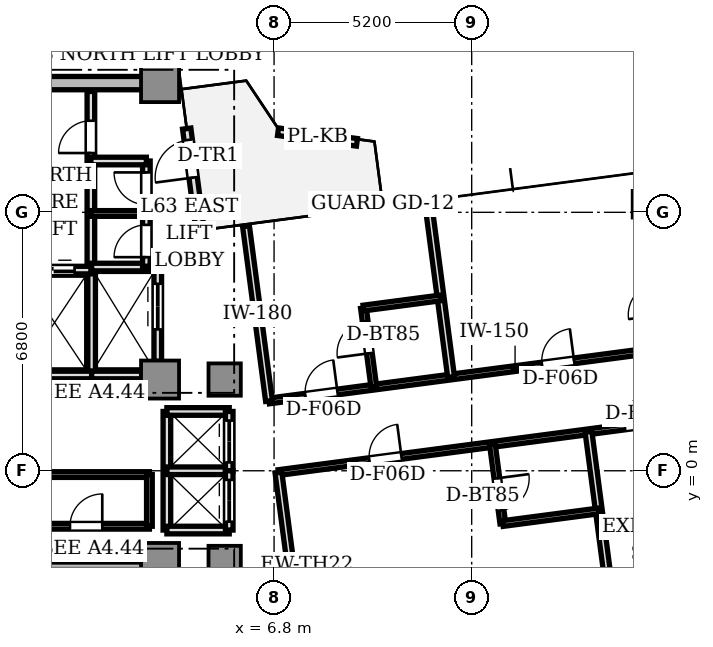
"""IFC4 building model, lengths in metres.
Left out: names, types, materials, properties, quantities, classifications, styles, units other than length and angle.
Written with IfcOpenShell. Run it as: python <this file> out.ifc"""

import sys

from ifc_helpers import new_model, si_unit, direction, frame, frame_2d, origin, origin_2d, place, context, subcontext, project, spatial, rectangle, extrude, source, transform, mapped, element, fill, save


model = new_model("IFC4")
c1 = context("Model", 3, precision=1e-05, world=origin(), true_north=direction((0.0, 1.0)))
c2 = subcontext(c1, "Body", "Model", "MODEL_VIEW")
j1 = project(units=[si_unit("LENGTHUNIT", "METRE"), si_unit("PLANEANGLEUNIT", "RADIAN")], contexts=[c1])
p1 = place(None, origin())
s1 = spatial("IfcSite", under=j1, at=p1, CompositionType="ELEMENT")
p2 = place(p1, origin())
s2 = spatial("IfcBuilding", under=s1, at=p2, CompositionType="ELEMENT")
p3 = place(p2, frame((0.0, 0.0, 226.6)))
s3 = spatial("IfcBuildingStorey", under=s2, at=p3, CompositionType="ELEMENT", Elevation=226.6)
p4 = place(p3, frame((-3.55, 10.2, 0.0), z_axis=(0.0, 0.0, 1.0), x_axis=(1.0, 0.0, 0.0)))
e1 = element("IfcWall", 1, at=p4, inside=s3, PredefinedType="SHEAR", context=c2, shape_type="SweptSolid", body=[
    extrude(rectangle(XDim=7.1, YDim=0.35, at=frame_2d((3.55, 0.0))), origin(), (0.0, 0.0, 1.0), 3.05),
])
m1 = source(origin(), c2, "Body", "SweptSolid", [
    extrude(rectangle(XDim=1.0, YDim=1.0, at=origin_2d()), origin(), (0.0, 0.0, 1.0), 3.05),
])
for number, where, z_axis, x_axis in (
    (2, (3.8, 2.4, 0.0), (0.0, 0.0, 1.0), (1.0, 0.0, 0.0)),
    (3, (3.8, 10.2, 0.0), (0.0, 0.0, 1.0), (1.0, 0.0, 0.0)),
    (4, (3.8, -2.4, 0.0), (0.0, 0.0, 1.0), (1.0, 0.0, 0.0)),
):
    element("IfcColumn", number, at=place(p3, frame(where, z_axis=z_axis, x_axis=x_axis)), inside=s3, PredefinedType="COLUMN", context=c2, shape_type="MappedRepresentation", body=[
        mapped(m1, transform((0.0, 0.0, 0.0), scale=1.0)),
    ])
m2 = source(origin(), c2, "Body", "SweptSolid", [
    extrude(rectangle(XDim=0.85, YDim=0.85, at=origin_2d()), origin(), (0.0, 0.0, 1.0), 3.05),
])
for number, where, z_axis, x_axis in (
    (5, (5.5, 2.4, 0.0), (0.0, 0.0, 1.0), (1.0, 0.0, 0.0)),
    (6, (5.5, -2.4, 0.0), (0.0, 0.0, 1.0), (1.0, 0.0, 0.0)),
):
    element("IfcColumn", number, at=place(p3, frame(where, z_axis=z_axis, x_axis=x_axis)), inside=s3, PredefinedType="COLUMN", context=c2, shape_type="MappedRepresentation", body=[
        mapped(m2, transform((0.0, 0.0, 0.0), scale=1.0)),
    ])
m3 = source(origin(), c2, "Body", "SweptSolid", [
    extrude(rectangle(XDim=0.7, YDim=0.7, at=origin_2d()), origin(), (0.0, 0.0, 1.0), 3.05),
])
p5 = place(p3, frame((16.586, 7.013, 0.0), z_axis=(0.0, 0.0, 1.0), x_axis=(1.0, 0.0, 0.0)))
e7 = element("IfcColumn", 7, at=p5, inside=s3, PredefinedType="COLUMN", context=c2, shape_type="MappedRepresentation", body=[
    mapped(m3, transform((0.0, 0.0, 0.0), scale=1.0)),
])
p6 = place(p3, frame((4.854, 6.326, 0.0), z_axis=(0.0, 0.0, 1.0), x_axis=(-0.130564442062, 0.991439824936, 0.0)))
e8 = element("IfcWall", 8, at=p6, inside=s3, PredefinedType="STANDARD", context=c2, shape_type="SweptSolid", body=[
    extrude(rectangle(XDim=2.7, YDim=0.22, at=frame_2d((1.35, 0.0))), origin(), (0.0, 0.0, 1.0), 3.05),
])
p7 = place(p6, frame((1.4, 0.0, 0.0)))
e9 = element("IfcOpeningElement", 9, at=p7, cuts=e8, PredefinedType="OPENING", context=c2, shape_type="SweptSolid", body=[
    extrude(rectangle(XDim=1.0, YDim=2.2, at=frame_2d((0.5, 1.1))), frame((0.0, 0.12, 0.0), z_axis=(0.0, -1.0, 0.0), x_axis=(1.0, 0.0, 0.0)), (0.0, 0.0, 1.0), 0.24),
])
p8 = place(p3, frame((8.981, 8.642, 0.0), z_axis=(0.0, 0.0, 1.0), x_axis=(-0.991074582074, 0.133308562245, 0.0)))
e10 = element("IfcWall", 10, at=p8, inside=s3, PredefinedType="PARAPET", context=c2, shape_type="SweptSolid", body=[
    extrude(rectangle(XDim=2.095, YDim=0.2, at=frame_2d((1.048, 0.0))), origin(), (0.0, 0.0, 1.0), 0.65),
])
p9 = place(p3, frame((0.0, -2.5, 0.0), z_axis=(0.0, 0.0, 1.0), x_axis=(1.0, 0.0, 0.0)))
e11 = element("IfcWall", 11, at=p9, inside=s3, PredefinedType="SOLIDWALL", context=c2, shape_type="SweptSolid", body=[
    extrude(rectangle(XDim=3.72, YDim=0.2, at=frame_2d((1.86, 0.0))), origin(), (0.0, 0.0, 1.0), 3.05),
])
p10 = place(p3, frame((1.98, 5.32, 0.0), z_axis=(0.0, 0.0, 1.0), x_axis=(0.0, 1.0, 0.0)))
e12 = element("IfcWall", 12, at=p10, inside=s3, PredefinedType="SOLIDWALL", context=c2, shape_type="SweptSolid", body=[
    extrude(rectangle(XDim=4.66, YDim=0.2, at=frame_2d((2.33, 0.0))), origin(), (0.0, 0.0, 1.0), 2.6),
])
p11 = place(p10, frame((3.04, 0.0, 0.0)))
e13 = element("IfcOpeningElement", 13, at=p11, cuts=e12, PredefinedType="OPENING", context=c2, shape_type="SweptSolid", body=[
    extrude(rectangle(XDim=0.85, YDim=2.1, at=frame_2d((0.425, 1.05))), frame((0.0, 0.11, 0.0), z_axis=(0.0, -1.0, 0.0), x_axis=(1.0, 0.0, 0.0)), (0.0, 0.0, 1.0), 0.22),
])
p12 = place(p3, frame((2.0, 2.5, 0.0), z_axis=(0.0, 0.0, 1.0), x_axis=(0.0, 1.0, 0.0)))
e14 = element("IfcWall", 14, at=p12, inside=s3, PredefinedType="SOLIDWALL", context=c2, shape_type="SweptSolid", body=[
    extrude(rectangle(XDim=2.78, YDim=0.2, at=frame_2d((1.39, 0.0))), origin(), (0.0, 0.0, 1.0), 2.6),
])
p13 = place(p3, frame((0.05, 2.52, 0.0), z_axis=(0.0, 0.0, 1.0), x_axis=(1.0, 0.0, 0.0)))
e15 = element("IfcWall", 15, at=p13, inside=s3, PredefinedType="SOLIDWALL", context=c2, shape_type="SweptSolid", body=[
    extrude(rectangle(XDim=1.95, YDim=0.2, at=frame_2d((0.975, 0.0))), origin(), (0.0, 0.0, 1.0), 2.6),
])
p14 = place(p3, frame((0.05, 5.28, 0.0), z_axis=(0.0, 0.0, 1.0), x_axis=(1.0, 0.0, 0.0)))
e16 = element("IfcWall", 16, at=p14, inside=s3, PredefinedType="SOLIDWALL", context=c2, shape_type="SweptSolid", body=[
    extrude(rectangle(XDim=1.93, YDim=0.2, at=frame_2d((0.965, 0.0))), origin(), (0.0, 0.0, 1.0), 2.6),
])
p15 = place(p14, frame((0.4, 0.0, 0.0)))
e17 = element("IfcOpeningElement", 17, at=p15, cuts=e16, PredefinedType="OPENING", context=c2, shape_type="SweptSolid", body=[
    extrude(rectangle(XDim=1.1, YDim=2.2, at=frame_2d((0.55, 1.1))), frame((0.0, 0.11, 0.0), z_axis=(0.0, -1.0, 0.0), x_axis=(1.0, 0.0, 0.0)), (0.0, 0.0, 1.0), 0.22),
])
p16 = place(p3, frame((2.0, 2.52, 0.0), z_axis=(0.0, 0.0, 1.0), x_axis=(1.0, 0.0, 0.0)))
e18 = element("IfcWall", 18, at=p16, inside=s3, PredefinedType="SOLIDWALL", context=c2, shape_type="SweptSolid", body=[
    extrude(rectangle(XDim=1.32, YDim=0.2, at=frame_2d((0.66, 0.0))), origin(), (0.0, 0.0, 1.0), 2.6),
])
p17 = place(p3, frame((2.0, 5.36, 0.0), z_axis=(0.0, 0.0, 1.0), x_axis=(1.0, 0.0, 0.0)))
e19 = element("IfcWall", 19, at=p17, inside=s3, PredefinedType="SOLIDWALL", context=c2, shape_type="SweptSolid", body=[
    extrude(rectangle(XDim=1.74, YDim=0.2, at=frame_2d((0.87, 0.0))), origin(), (0.0, 0.0, 1.0), 2.6),
])
p18 = place(p3, frame((3.74, 2.88, 0.0), z_axis=(0.0, 0.0, 1.0), x_axis=(0.0, 1.0, 0.0)))
e20 = element("IfcWall", 20, at=p18, inside=s3, PredefinedType="SOLIDWALL", context=c2, shape_type="SweptSolid", body=[
    extrude(rectangle(XDim=2.48, YDim=0.2, at=frame_2d((1.24, 0.0))), origin(), (0.0, 0.0, 1.0), 2.6),
])
p19 = place(p18, frame((0.84, 0.0, 0.0)))
e21 = element("IfcOpeningElement", 21, at=p19, cuts=e20, PredefinedType="OPENING", context=c2, shape_type="SweptSolid", body=[
    extrude(rectangle(XDim=1.2, YDim=2.2, at=frame_2d((0.6, 1.1))), frame((0.0, 0.11, 0.0), z_axis=(0.0, -1.0, 0.0), x_axis=(1.0, 0.0, 0.0)), (0.0, 0.0, 1.0), 0.22),
])
p20 = place(p3, frame((3.98, -1.56, 0.0), z_axis=(0.0, 0.0, 1.0), x_axis=(0.0, 1.0, 0.0)))
e22 = element("IfcWall", 22, at=p20, inside=s3, PredefinedType="SOLIDWALL", context=c2, shape_type="SweptSolid", body=[
    extrude(rectangle(XDim=3.12, YDim=0.2, at=frame_2d((1.56, 0.0))), origin(), (0.0, 0.0, 1.0), 2.27),
])
for number, where, z_axis, x_axis in (
    (23, (3.98, 1.56, 0.0), (0.0, 0.0, 1.0), (1.0, 0.0, 0.0)),
    (24, (3.98, -1.56, 0.0), (0.0, 0.0, 1.0), (1.0, 0.0, 0.0)),
    (25, (3.98, 0.0, 0.0), (0.0, 0.0, 1.0), (1.0, 0.0, 0.0)),
):
    element("IfcWall", number, at=place(p3, frame(where, z_axis=z_axis, x_axis=x_axis)), inside=s3, PredefinedType="SOLIDWALL", context=c2, shape_type="SweptSolid", body=[
        extrude(rectangle(XDim=1.64, YDim=0.2, at=frame_2d((0.82, 0.0))), origin(), (0.0, 0.0, 1.0), 2.6),
    ])
p21 = place(p3, frame((5.62, 0.0, 0.0), z_axis=(0.0, 0.0, 1.0), x_axis=(0.0, 1.0, 0.0)))
e26 = element("IfcWall", 26, at=p21, inside=s3, PredefinedType="SOLIDWALL", context=c2, shape_type="SweptSolid", body=[
    extrude(rectangle(XDim=1.56, YDim=0.2, at=frame_2d((0.78, 0.0))), origin(), (0.0, 0.0, 1.0), 2.6),
])
p22 = place(p21, frame((0.22, 0.0, 0.0)))
e27 = element("IfcOpeningElement", 27, at=p22, cuts=e26, PredefinedType="OPENING", context=c2, shape_type="SweptSolid", body=[
    extrude(rectangle(XDim=1.1, YDim=2.2, at=frame_2d((0.55, 1.1))), frame((0.0, 0.11, 0.0), z_axis=(0.0, -1.0, 0.0), x_axis=(1.0, 0.0, 0.0)), (0.0, 0.0, 1.0), 0.22),
])
p23 = place(p3, frame((5.62, -1.56, 0.0), z_axis=(0.0, 0.0, 1.0), x_axis=(0.0, 1.0, 0.0)))
e28 = element("IfcWall", 28, at=p23, inside=s3, PredefinedType="SOLIDWALL", context=c2, shape_type="SweptSolid", body=[
    extrude(rectangle(XDim=1.56, YDim=0.2, at=frame_2d((0.78, 0.0))), origin(), (0.0, 0.0, 1.0), 2.6),
])
p24 = place(p23, frame((0.22, 0.0, 0.0)))
e29 = element("IfcOpeningElement", 29, at=p24, cuts=e28, PredefinedType="OPENING", context=c2, shape_type="SweptSolid", body=[
    extrude(rectangle(XDim=1.1, YDim=2.2, at=frame_2d((0.55, 1.1))), frame((0.0, 0.11, 0.0), z_axis=(0.0, -1.0, 0.0), x_axis=(1.0, 0.0, 0.0)), (0.0, 0.0, 1.0), 0.22),
])
p25 = place(p3, frame((3.44, 5.38, 0.0), z_axis=(0.0, 0.0, 1.0), x_axis=(0.0, 1.0, 0.0)))
e30 = element("IfcWall", 30, at=p25, inside=s3, PredefinedType="SOLIDWALL", context=c2, shape_type="SweptSolid", body=[
    extrude(rectangle(XDim=2.77, YDim=0.2, at=frame_2d((1.385, 0.0))), origin(), (0.0, 0.0, 1.0), 2.6),
])
p26 = place(p25, frame((0.24, 0.0, 0.0)))
e31 = element("IfcOpeningElement", 31, at=p26, cuts=e30, PredefinedType="OPENING", context=c2, shape_type="SweptSolid", body=[
    extrude(rectangle(XDim=0.85, YDim=2.1, at=frame_2d((0.425, 1.05))), frame((0.0, 0.11, 0.0), z_axis=(0.0, -1.0, 0.0), x_axis=(1.0, 0.0, 0.0)), (0.0, 0.0, 1.0), 0.22),
])
p27 = place(p25, frame((1.62, 0.0, 0.0)))
e32 = element("IfcOpeningElement", 32, at=p27, cuts=e30, PredefinedType="OPENING", context=c2, shape_type="SweptSolid", body=[
    extrude(rectangle(XDim=0.85, YDim=2.1, at=frame_2d((0.425, 1.05))), frame((0.0, 0.11, 0.0), z_axis=(0.0, -1.0, 0.0), x_axis=(1.0, 0.0, 0.0)), (0.0, 0.0, 1.0), 0.22),
])
p28 = place(p3, frame((1.98, 8.15, 0.0), z_axis=(0.0, 0.0, 1.0), x_axis=(1.0, 0.0, 0.0)))
e33 = element("IfcWall", 33, at=p28, inside=s3, PredefinedType="SOLIDWALL", context=c2, shape_type="SweptSolid", body=[
    extrude(rectangle(XDim=1.46, YDim=0.2, at=frame_2d((0.73, 0.0))), origin(), (0.0, 0.0, 1.0), 2.6),
])
p29 = place(p3, frame((1.98, 6.77, 0.0), z_axis=(0.0, 0.0, 1.0), x_axis=(1.0, 0.0, 0.0)))
e34 = element("IfcWall", 34, at=p29, inside=s3, PredefinedType="PARTITIONING", context=c2, shape_type="SweptSolid", body=[
    extrude(rectangle(XDim=1.46, YDim=0.15, at=frame_2d((0.73, 0.0))), origin(), (0.0, 0.0, 1.0), 2.6),
])
p30 = place(p3, frame((0.38, -0.1, 0.0), z_axis=(0.0, 0.0, 1.0), x_axis=(1.0, 0.0, 0.0)))
e35 = element("IfcWall", 35, at=p30, inside=s3, PredefinedType="PARTITIONING", context=c2, shape_type="SweptSolid", body=[
    extrude(rectangle(XDim=3.14, YDim=0.15, at=frame_2d((1.57, 0.0))), origin(), (0.0, 0.0, 1.0), 2.6),
])
p31 = place(p3, frame((0.38, -1.46, 0.0), z_axis=(0.0, 0.0, 1.0), x_axis=(1.0, 0.0, 0.0)))
e36 = element("IfcWall", 36, at=p31, inside=s3, PredefinedType="PARTITIONING", context=c2, shape_type="SweptSolid", body=[
    extrude(rectangle(XDim=3.14, YDim=0.15, at=frame_2d((1.57, 0.0))), origin(), (0.0, 0.0, 1.0), 2.6),
])
p32 = place(p31, frame((1.05, 0.0, 0.0)))
e37 = element("IfcOpeningElement", 37, at=p32, cuts=e36, PredefinedType="OPENING", context=c2, shape_type="SweptSolid", body=[
    extrude(rectangle(XDim=0.85, YDim=2.1, at=frame_2d((0.425, 1.05))), frame((0.0, 0.085, 0.0), z_axis=(0.0, -1.0, 0.0), x_axis=(1.0, 0.0, 0.0)), (0.0, 0.0, 1.0), 0.17),
])
p33 = place(p3, frame((3.52, -1.46, 0.0), z_axis=(0.0, 0.0, 1.0), x_axis=(0.0, 1.0, 0.0)))
e38 = element("IfcWall", 38, at=p33, inside=s3, PredefinedType="PARTITIONING", context=c2, shape_type="SweptSolid", body=[
    extrude(rectangle(XDim=1.36, YDim=0.15, at=frame_2d((0.68, 0.0))), origin(), (0.0, 0.0, 1.0), 2.27),
])
p34 = place(p3, frame((6.667, 1.836, 0.0), z_axis=(0.0, 0.0, 1.0), x_axis=(0.991445639992, 0.130520277895, 0.0)))
e39 = element("IfcWall", 39, at=p34, inside=s3, PredefinedType="PARTITIONING", context=c2, shape_type="SweptSolid", body=[
    extrude(rectangle(XDim=13.06, YDim=0.15, at=frame_2d((6.53, 0.0))), origin(), (0.0, 0.0, 1.0), 2.6),
])
p35 = place(p34, frame((0.966, 0.0, 0.0)))
e40 = element("IfcOpeningElement", 40, at=p35, cuts=e39, PredefinedType="OPENING", context=c2, shape_type="SweptSolid", body=[
    extrude(rectangle(XDim=0.85, YDim=2.1, at=frame_2d((0.425, 1.05))), frame((0.0, 0.085, 0.0), z_axis=(0.0, -1.0, 0.0), x_axis=(1.0, 0.0, 0.0)), (0.0, 0.0, 1.0), 0.17),
])
p36 = place(p34, frame((7.246, 0.0, 0.0)))
e41 = element("IfcOpeningElement", 41, at=p36, cuts=e39, PredefinedType="OPENING", context=c2, shape_type="SweptSolid", body=[
    extrude(rectangle(XDim=0.85, YDim=2.1, at=frame_2d((0.425, 1.05))), frame((0.0, 0.085, 0.0), z_axis=(0.0, -1.0, 0.0), x_axis=(1.0, 0.0, 0.0)), (0.0, 0.0, 1.0), 0.17),
])
p37 = place(p3, frame((6.915, -0.048, 0.0), z_axis=(0.0, 0.0, 1.0), x_axis=(0.991443539316, 0.130536233856, 0.0)))
e42 = element("IfcWall", 42, at=p37, inside=s3, PredefinedType="PARTITIONING", context=c2, shape_type="SweptSolid", body=[
    extrude(rectangle(XDim=13.06, YDim=0.15, at=frame_2d((6.53, 0.0))), origin(), (0.0, 0.0, 1.0), 2.6),
])
p38 = place(p37, frame((2.414, 0.0, 0.0)))
e43 = element("IfcOpeningElement", 43, at=p38, cuts=e42, PredefinedType="OPENING", context=c2, shape_type="SweptSolid", body=[
    extrude(rectangle(XDim=0.85, YDim=2.1, at=frame_2d((0.425, 1.05))), frame((0.0, 0.085, 0.0), z_axis=(0.0, -1.0, 0.0), x_axis=(1.0, 0.0, 0.0)), (0.0, 0.0, 1.0), 0.17),
])
p39 = place(p37, frame((9.194, 0.0, 0.0)))
e44 = element("IfcOpeningElement", 44, at=p39, cuts=e42, PredefinedType="OPENING", context=c2, shape_type="SweptSolid", body=[
    extrude(rectangle(XDim=0.85, YDim=2.1, at=frame_2d((0.425, 1.05))), frame((0.0, 0.085, 0.0), z_axis=(0.0, -1.0, 0.0), x_axis=(1.0, 0.0, 0.0)), (0.0, 0.0, 1.0), 0.17),
])
p40 = place(p3, frame((6.667, 1.836, 0.0), z_axis=(0.0, 0.0, 1.0), x_axis=(-0.130543018951, 0.991442645947, 0.0)))
e45 = element("IfcWall", 45, at=p40, inside=s3, PredefinedType="PARTITIONING", context=c2, shape_type="SweptSolid", body=[
    extrude(rectangle(XDim=4.638, YDim=0.18, at=frame_2d((2.319, 0.0))), origin(), (0.0, 0.0, 1.0), 2.6),
])
p41 = place(p3, frame((7.521, -4.646, 0.0), z_axis=(0.0, 0.0, 1.0), x_axis=(-0.130549832066, 0.991441748842, 0.0)))
e46 = element("IfcWall", 46, at=p41, inside=s3, PredefinedType="PARTITIONING", context=c2, shape_type="SweptSolid", body=[
    extrude(rectangle(XDim=4.638, YDim=0.18, at=frame_2d((2.319, 0.0))), origin(), (0.0, 0.0, 1.0), 2.6),
])
p42 = place(p3, frame((11.458, 2.467, 0.0), z_axis=(0.0, 0.0, 1.0), x_axis=(-0.130498087646, 0.991448561006, 0.0)))
e47 = element("IfcWall", 47, at=p42, inside=s3, PredefinedType="PARTITIONING", context=c2, shape_type="SweptSolid", body=[
    extrude(rectangle(XDim=4.638, YDim=0.18, at=frame_2d((2.319, 0.0))), origin(), (0.0, 0.0, 1.0), 2.6),
])
p43 = place(p3, frame((9.426, 2.199, 0.0), z_axis=(0.0, 0.0, 1.0), x_axis=(-0.130457520295, 0.991453899785, 0.0)))
e48 = element("IfcWall", 48, at=p43, inside=s3, PredefinedType="PARTITIONING", context=c2, shape_type="SweptSolid", body=[
    extrude(rectangle(XDim=2.1, YDim=0.15, at=frame_2d((1.05, 0.0))), origin(), (0.0, 0.0, 1.0), 2.6),
])
p44 = place(p43, frame((0.9, 0.0, 0.0)))
e49 = element("IfcOpeningElement", 49, at=p44, cuts=e48, PredefinedType="OPENING", context=c2, shape_type="SweptSolid", body=[
    extrude(rectangle(XDim=0.85, YDim=2.1, at=frame_2d((0.425, 1.05))), frame((0.0, 0.085, 0.0), z_axis=(0.0, -1.0, 0.0), x_axis=(1.0, 0.0, 0.0)), (0.0, 0.0, 1.0), 0.17),
])
p45 = place(p3, frame((9.152, 4.281, 0.0), z_axis=(0.0, 0.0, 1.0), x_axis=(0.991444969909, 0.13052536781, 0.0)))
e50 = element("IfcWall", 50, at=p45, inside=s3, PredefinedType="PARTITIONING", context=c2, shape_type="SweptSolid", body=[
    extrude(rectangle(XDim=2.05, YDim=0.15, at=frame_2d((1.025, 0.0))), origin(), (0.0, 0.0, 1.0), 2.6),
])
p46 = place(p3, frame((15.073, 1.026, 0.0), z_axis=(0.0, 0.0, 1.0), x_axis=(0.130549832066, -0.991441748842, 0.0)))
e51 = element("IfcWall", 51, at=p46, inside=s3, PredefinedType="PARTITIONING", context=c2, shape_type="SweptSolid", body=[
    extrude(rectangle(XDim=4.638, YDim=0.18, at=frame_2d((2.319, 0.0))), origin(), (0.0, 0.0, 1.0), 2.6),
])
p47 = place(p3, frame((12.545, 0.693, 0.0), z_axis=(0.0, 0.0, 1.0), x_axis=(0.13044248305, -0.9914558783, 0.0)))
e52 = element("IfcWall", 52, at=p47, inside=s3, PredefinedType="PARTITIONING", context=c2, shape_type="SweptSolid", body=[
    extrude(rectangle(XDim=2.1, YDim=0.15, at=frame_2d((1.05, 0.0))), origin(), (0.0, 0.0, 1.0), 2.6),
])
p48 = place(p47, frame((0.9, 0.0, 0.0)))
e53 = element("IfcOpeningElement", 53, at=p48, cuts=e52, PredefinedType="OPENING", context=c2, shape_type="SweptSolid", body=[
    extrude(rectangle(XDim=0.85, YDim=2.1, at=frame_2d((0.425, 1.05))), frame((0.0, 0.085, 0.0), z_axis=(0.0, -1.0, 0.0), x_axis=(1.0, 0.0, 0.0)), (0.0, 0.0, 1.0), 0.17),
])
p49 = place(p3, frame((12.819, -1.389, 0.0), z_axis=(0.0, 0.0, 1.0), x_axis=(0.99144973294, 0.130489183661, 0.0)))
e54 = element("IfcWall", 54, at=p49, inside=s3, PredefinedType="PARTITIONING", context=c2, shape_type="SweptSolid", body=[
    extrude(rectangle(XDim=2.55, YDim=0.15, at=frame_2d((1.275, 0.0))), origin(), (0.0, 0.0, 1.0), 2.6),
])
m4 = source(origin(), c2, "Body", "SweptSolid", [
    extrude(rectangle(XDim=1.0, YDim=0.05, at=origin_2d()), origin(), (0.0, 0.0, 1.0), 2.2),
])
p50 = place(p7, frame((0.5, 0.0, 0.0)))
e55 = element("IfcDoor", 55, at=p50, inside=s3, OperationType="SINGLE_SWING_LEFT", PredefinedType="DOOR", context=c2, shape_type="MappedRepresentation", body=[
    mapped(m4, transform((0.0, 0.0, 0.0), scale=1.0)),
])
fill(e9, e55)
m5 = source(origin(), c2, "Body", "SweptSolid", [
    extrude(rectangle(XDim=0.85, YDim=0.05, at=origin_2d()), origin(), (0.0, 0.0, 1.0), 2.1),
])
p51 = place(p11, frame((0.425, 0.0, 0.0)))
e56 = element("IfcDoor", 56, at=p51, inside=s3, OperationType="SINGLE_SWING_LEFT", PredefinedType="DOOR", context=c2, shape_type="MappedRepresentation", body=[
    mapped(m5, transform((0.0, 0.0, 0.0), scale=1.0)),
])
fill(e13, e56)
m6 = source(origin(), c2, "Body", "SweptSolid", [
    extrude(rectangle(XDim=1.1, YDim=0.05, at=origin_2d()), origin(), (0.0, 0.0, 1.0), 2.2),
])
p52 = place(p15, frame((0.55, 0.0, 0.0)))
e57 = element("IfcDoor", 57, at=p52, inside=s3, OperationType="DOUBLE_DOOR_SLIDING", PredefinedType="DOOR", context=c2, shape_type="MappedRepresentation", body=[
    mapped(m6, transform((0.0, 0.0, 0.0), scale=1.0)),
])
fill(e17, e57)
m7 = source(origin(), c2, "Body", "SweptSolid", [
    extrude(rectangle(XDim=1.2, YDim=0.05, at=origin_2d()), origin(), (0.0, 0.0, 1.0), 2.2),
])
p53 = place(p19, frame((0.6, 0.0, 0.0)))
e58 = element("IfcDoor", 58, at=p53, inside=s3, OperationType="DOUBLE_DOOR_SLIDING", PredefinedType="DOOR", context=c2, shape_type="MappedRepresentation", body=[
    mapped(m7, transform((0.0, 0.0, 0.0), scale=1.0)),
])
fill(e21, e58)
p54 = place(p22, frame((0.55, 0.0, 0.0)))
e59 = element("IfcDoor", 59, at=p54, inside=s3, OperationType="DOUBLE_DOOR_SLIDING", PredefinedType="DOOR", context=c2, shape_type="MappedRepresentation", body=[
    mapped(m6, transform((0.0, 0.0, 0.0), scale=1.0)),
])
fill(e27, e59)
p55 = place(p24, frame((0.55, 0.0, 0.0)))
e60 = element("IfcDoor", 60, at=p55, inside=s3, OperationType="DOUBLE_DOOR_SLIDING", PredefinedType="DOOR", context=c2, shape_type="MappedRepresentation", body=[
    mapped(m6, transform((0.0, 0.0, 0.0), scale=1.0)),
])
fill(e29, e60)
p56 = place(p26, frame((0.425, 0.0, 0.0)))
e61 = element("IfcDoor", 61, at=p56, inside=s3, OperationType="SINGLE_SWING_LEFT", PredefinedType="DOOR", context=c2, shape_type="MappedRepresentation", body=[
    mapped(m5, transform((0.0, 0.0, 0.0), scale=1.0)),
])
fill(e31, e61)
p57 = place(p27, frame((0.425, 0.0, 0.0)))
e62 = element("IfcDoor", 62, at=p57, inside=s3, OperationType="SINGLE_SWING_RIGHT", PredefinedType="DOOR", context=c2, shape_type="MappedRepresentation", body=[
    mapped(m5, transform((0.0, 0.0, 0.0), scale=1.0)),
])
fill(e32, e62)
p58 = place(p32, frame((0.425, 0.0, 0.0)))
e63 = element("IfcDoor", 63, at=p58, inside=s3, OperationType="SINGLE_SWING_RIGHT", PredefinedType="DOOR", context=c2, shape_type="MappedRepresentation", body=[
    mapped(m5, transform((0.0, 0.0, 0.0), scale=1.0)),
])
fill(e37, e63)
p59 = place(p44, frame((0.425, 0.0, 0.0)))
e64 = element("IfcDoor", 64, at=p59, inside=s3, OperationType="SINGLE_SWING_LEFT", PredefinedType="DOOR", context=c2, shape_type="MappedRepresentation", body=[
    mapped(m5, transform((0.0, 0.0, 0.0), scale=1.0)),
])
fill(e49, e64)
p60 = place(p35, frame((0.425, 0.0, 0.0)))
e65 = element("IfcDoor", 65, at=p60, inside=s3, OperationType="SINGLE_SWING_RIGHT", PredefinedType="DOOR", context=c2, shape_type="MappedRepresentation", body=[
    mapped(m5, transform((0.0, 0.0, 0.0), scale=1.0)),
])
fill(e40, e65)
p61 = place(p36, frame((0.425, 0.0, 0.0)))
e66 = element("IfcDoor", 66, at=p61, inside=s3, OperationType="SINGLE_SWING_RIGHT", PredefinedType="DOOR", context=c2, shape_type="MappedRepresentation", body=[
    mapped(m5, transform((0.0, 0.0, 0.0), scale=1.0)),
])
fill(e41, e66)
p62 = place(p48, frame((0.425, 0.0, 0.0)))
e67 = element("IfcDoor", 67, at=p62, inside=s3, OperationType="SINGLE_SWING_LEFT", PredefinedType="DOOR", context=c2, shape_type="MappedRepresentation", body=[
    mapped(m5, transform((0.0, 0.0, 0.0), scale=1.0)),
])
fill(e53, e67)
p63 = place(p38, frame((0.425, 0.0, 0.0)))
e68 = element("IfcDoor", 68, at=p63, inside=s3, OperationType="SINGLE_SWING_RIGHT", PredefinedType="DOOR", context=c2, shape_type="MappedRepresentation", body=[
    mapped(m5, transform((0.0, 0.0, 0.0), scale=1.0)),
])
fill(e43, e68)
p64 = place(p39, frame((0.425, 0.0, 0.0)))
e69 = element("IfcDoor", 69, at=p64, inside=s3, OperationType="SINGLE_SWING_RIGHT", PredefinedType="DOOR", context=c2, shape_type="MappedRepresentation", body=[
    mapped(m5, transform((0.0, 0.0, 0.0), scale=1.0)),
])
fill(e44, e69)
save(model, sys.argv[1])
